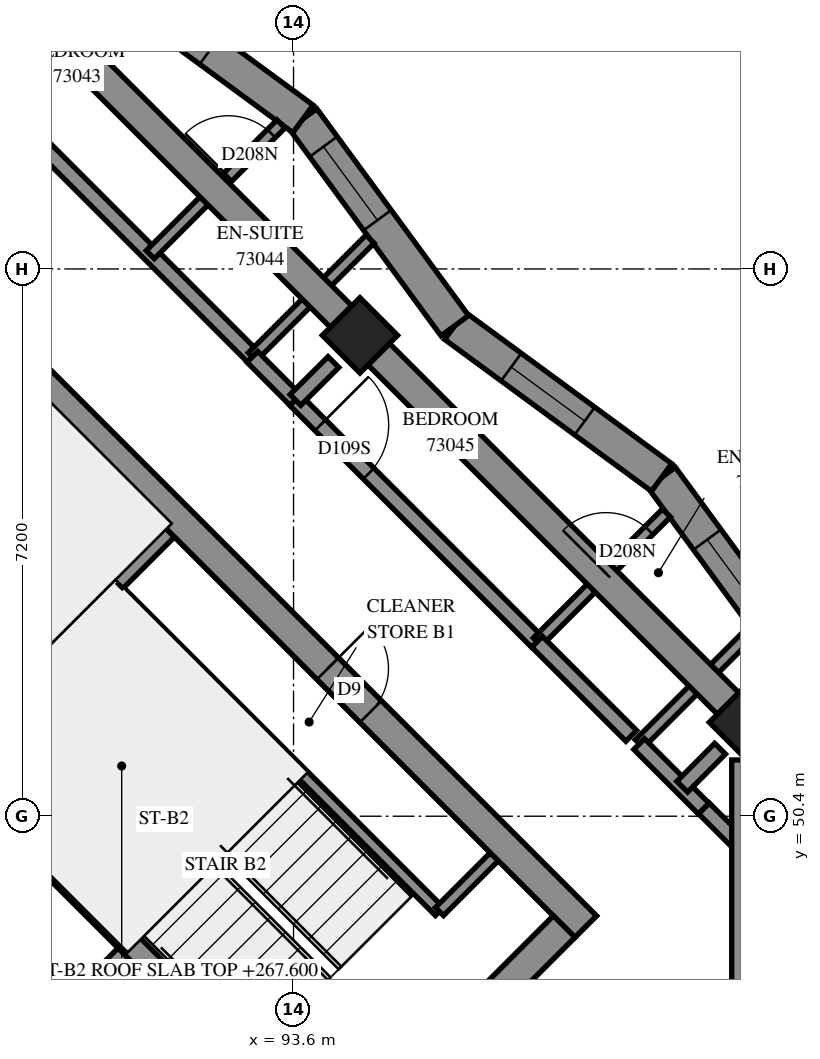
"""IFC4 building model, lengths in metres.
Left out: names, types, materials, properties, quantities, classifications, styles, units other than length and angle.
Written with IfcOpenShell. Run it as: python <this file> out.ifc"""

import sys

from ifc_helpers import new_model, si_unit, direction, frame, frame_2d, origin, origin_2d, place, context, subcontext, project, spatial, polyline, rectangle, outline, extrude, element, fill, save


model = new_model("IFC4")
c1 = context("Model", 3, precision=1e-05, world=origin(), true_north=direction((0.0, 1.0)))
c2 = subcontext(c1, "Body", "Model", "MODEL_VIEW")
j1 = project(units=[si_unit("LENGTHUNIT", "METRE"), si_unit("PLANEANGLEUNIT", "RADIAN")], contexts=[c1])
p1 = place(None, origin())
s1 = spatial("IfcSite", under=j1, at=p1, CompositionType="ELEMENT")
p2 = place(p1, origin())
s2 = spatial("IfcBuilding", under=s1, at=p2, CompositionType="ELEMENT")
p3 = place(p2, frame((0.0, 0.0, 267.6)))
s3 = spatial("IfcBuildingStorey", under=s2, at=p3, CompositionType="ELEMENT", Elevation=267.6)
for number, where, z_axis, x_axis in (
    (1, (94.474, 56.727, 0.0), (0.0, 0.0, 1.0), (0.707, -0.707, 0.0)),
    (2, (99.565, 51.635, 0.0), (0.0, 0.0, 1.0), (0.707, -0.707, 0.0)),
):
    element("IfcColumn", number, at=place(p3, frame(where, z_axis=z_axis, x_axis=x_axis)), inside=s3, PredefinedType="COLUMN", context=c2, shape_type="SweptSolid", body=[
        extrude(rectangle(XDim=0.7, YDim=0.7, at=origin_2d()), origin(), (0.0, 0.0, 1.0), 3.1),
    ])
p4 = place(p3, frame((86.695, 59.696, -0.3), z_axis=(0.0, 0.0, 1.0), x_axis=(0.7071100706, -0.7071034917, 0.0)))
e3 = element("IfcWall", 3, at=p4, inside=s3, PredefinedType="SHEAR", context=c2, shape_type="SweptSolid", body=[
    extrude(rectangle(XDim=15.2, YDim=0.4, at=frame_2d((7.6, 0.0))), origin(), (0.0, 0.0, 1.0), 2.7),
])
p5 = place(p4, frame((10.4, 0.0, 0.3)))
e4 = element("IfcOpeningElement", 4, at=p5, cuts=e3, PredefinedType="OPENING", context=c2, shape_type="SweptSolid", body=[
    extrude(rectangle(XDim=0.8, YDim=2.1, at=frame_2d((0.4, 1.05))), frame((0.0, 0.21, 0.0), z_axis=(0.0, -1.0, 0.0), x_axis=(1.0, 0.0, 0.0)), (0.0, 0.0, 1.0), 0.42),
])
p6 = place(p3, frame((86.978, 38.766, -0.3), z_axis=(0.0, 0.0, 1.0), x_axis=(0.7071067812, 0.7071067812, 0.0)))
e5 = element("IfcWall", 5, at=p6, inside=s3, PredefinedType="SHEAR", context=c2, shape_type="SweptSolid", body=[
    extrude(rectangle(XDim=14.4, YDim=0.4, at=frame_2d((7.2, 0.0))), origin(), (0.0, 0.0, 1.0), 2.7),
])
p7 = place(p6, frame((4.55, 0.0, 0.3)))
e6 = element("IfcOpeningElement", 6, at=p7, cuts=e5, PredefinedType="OPENING", context=c2, shape_type="SweptSolid", body=[
    extrude(rectangle(XDim=1.1, YDim=2.1, at=frame_2d((0.55, 1.05))), frame((0.0, 0.21, 0.0), z_axis=(0.0, -1.0, 0.0), x_axis=(1.0, 0.0, 0.0)), (0.0, 0.0, 1.0), 0.42),
])
p8 = place(p6, frame((11.35, 0.0, 0.3)))
e7 = element("IfcOpeningElement", 7, at=p8, cuts=e5, PredefinedType="OPENING", context=c2, shape_type="SweptSolid", body=[
    extrude(rectangle(XDim=1.1, YDim=2.1, at=frame_2d((0.55, 1.05))), frame((0.0, 0.21, 0.0), z_axis=(0.0, -1.0, 0.0), x_axis=(1.0, 0.0, 0.0)), (0.0, 0.0, 1.0), 0.42),
])
p9 = place(p3, frame((89.17, 46.332, 0.0), z_axis=(0.0, 0.0, 1.0), x_axis=(0.7071067812, 0.7071067812, 0.0)))
e8 = element("IfcWall", 8, at=p9, inside=s3, PredefinedType="SOLIDWALL", context=c2, shape_type="SweptSolid", body=[
    extrude(rectangle(XDim=3.3, YDim=0.3, at=frame_2d((1.65, 0.0))), origin(), (0.0, 0.0, 1.0), 3.1),
])
p10 = place(p3, frame((81.534, 53.969, 0.0), z_axis=(0.0, 0.0, 1.0), x_axis=(0.707103309, -0.7071102534, 0.0)))
e9 = element("IfcWall", 9, at=p10, inside=s3, PredefinedType="SOLIDWALL", context=c2, shape_type="SweptSolid", body=[
    extrude(rectangle(XDim=14.4, YDim=0.3, at=frame_2d((7.2, 0.0))), origin(), (0.0, 0.0, 1.0), 3.1),
])
p11 = place(p10, frame((8.55, 0.0, 0.0)))
e10 = element("IfcOpeningElement", 10, at=p11, cuts=e9, PredefinedType="OPENING", context=c2, shape_type="SweptSolid", body=[
    extrude(rectangle(XDim=0.9, YDim=2.1, at=frame_2d((0.45, 1.05))), frame((0.0, 0.16, 0.0), z_axis=(0.0, -1.0, 0.0), x_axis=(1.0, 0.0, 0.0)), (0.0, 0.0, 1.0), 0.32),
])
p12 = place(p10, frame((1.25, 0.0, 0.0)))
e11 = element("IfcOpeningElement", 11, at=p12, cuts=e9, PredefinedType="OPENING", context=c2, shape_type="SweptSolid", body=[
    extrude(rectangle(XDim=1.1, YDim=2.1, at=frame_2d((0.55, 1.05))), frame((0.0, 0.16, 0.0), z_axis=(0.0, -1.0, 0.0), x_axis=(1.0, 0.0, 0.0)), (0.0, 0.0, 1.0), 0.32),
])
p13 = place(p10, frame((4.85, 0.0, 0.0)))
e12 = element("IfcOpeningElement", 12, at=p13, cuts=e9, PredefinedType="OPENING", context=c2, shape_type="SweptSolid", body=[
    extrude(rectangle(XDim=1.1, YDim=2.1, at=frame_2d((0.55, 1.05))), frame((0.0, 0.16, 0.0), z_axis=(0.0, -1.0, 0.0), x_axis=(1.0, 0.0, 0.0)), (0.0, 0.0, 1.0), 0.32),
])
p14 = place(p10, frame((12.05, 0.0, 0.0)))
e13 = element("IfcOpeningElement", 13, at=p14, cuts=e9, PredefinedType="OPENING", context=c2, shape_type="SweptSolid", body=[
    extrude(rectangle(XDim=1.1, YDim=2.1, at=frame_2d((0.55, 1.05))), frame((0.0, 0.16, 0.0), z_axis=(0.0, -1.0, 0.0), x_axis=(1.0, 0.0, 0.0)), (0.0, 0.0, 1.0), 0.32),
])
p15 = place(p3, frame((88.958, 51.211, 0.0), z_axis=(0.0, 0.0, 1.0), x_axis=(0.7070998367, -0.7071137256, 0.0)))
e14 = element("IfcWall", 14, at=p15, inside=s3, PredefinedType="SOLIDWALL", context=c2, shape_type="SweptSolid", body=[
    extrude(rectangle(XDim=7.2, YDim=0.3, at=frame_2d((3.6, 0.0))), origin(), (0.0, 0.0, 1.0), 3.1),
])
p16 = place(p3, frame((88.958, 51.211, 0.0), z_axis=(0.0, 0.0, 1.0), x_axis=(0.7071067812, 0.7071067812, 0.0)))
e15 = element("IfcWall", 15, at=p16, inside=s3, PredefinedType="SOLIDWALL", context=c2, shape_type="SweptSolid", body=[
    extrude(rectangle(XDim=4.2, YDim=0.3, at=frame_2d((2.1, 0.0))), origin(), (0.0, 0.0, 1.0), 3.1),
])
p17 = place(p3, frame((99.246, 46.544, 0.0), z_axis=(0.0, 0.0, 1.0), x_axis=(0.7071067812, 0.7071067812, 0.0)))
e16 = element("IfcWall", 16, at=p17, inside=s3, PredefinedType="SOLIDWALL", context=c2, shape_type="SweptSolid", body=[
    extrude(outline(polyline([(0.225, -0.225), (6.137, -0.225), (5.513, 0.225), (-0.225, 0.225), (0.225, -0.225)])), origin(), (0.0, 0.0, 1.0), 3.1),
])
p18 = place(p17, frame((0.713, 0.0, 0.6)))
e17 = element("IfcOpeningElement", 17, at=p18, cuts=e16, PredefinedType="OPENING", context=c2, shape_type="SweptSolid", body=[
    extrude(rectangle(XDim=1.8, YDim=1.9, at=frame_2d((0.9, 0.95))), frame((0.0, 0.235, 0.0), z_axis=(0.0, -1.0, 0.0), x_axis=(1.0, 0.0, 0.0)), (0.0, 0.0, 1.0), 0.47),
])
p19 = place(p17, frame((3.969, 0.0, 0.6)))
e18 = element("IfcOpeningElement", 18, at=p19, cuts=e16, PredefinedType="OPENING", context=c2, shape_type="SweptSolid", body=[
    extrude(rectangle(XDim=1.2, YDim=1.9, at=frame_2d((0.6, 0.95))), frame((0.0, 0.235, 0.0), z_axis=(0.0, -1.0, 0.0), x_axis=(1.0, 0.0, 0.0)), (0.0, 0.0, 1.0), 0.47),
])
p20 = place(p3, frame((100.451, 52.12, 0.0), z_axis=(0.0, 0.0, 1.0), x_axis=(-0.5916343714, 0.8062064069, 0.0)))
e19 = element("IfcWall", 19, at=p20, inside=s3, PredefinedType="SOLIDWALL", context=c2, shape_type="SweptSolid", body=[
    extrude(outline(polyline([(0.054, -0.225), (3.429, -0.225), (3.36, 0.225), (-0.054, 0.225), (0.054, -0.225)])), origin(), (0.0, 0.0, 1.0), 3.1),
])
p21 = place(p20, frame((1.18, 0.0, 0.45)))
e20 = element("IfcOpeningElement", 20, at=p21, cuts=e19, PredefinedType="OPENING", context=c2, shape_type="SweptSolid", body=[
    extrude(rectangle(XDim=1.2, YDim=2.55, at=frame_2d((0.6, 1.275))), frame((0.0, 0.235, 0.0), z_axis=(0.0, -1.0, 0.0), x_axis=(1.0, 0.0, 0.0)), (0.0, 0.0, 1.0), 0.47),
])
p22 = place(p3, frame((98.442, 54.857, 0.0), z_axis=(0.0, 0.0, 1.0), x_axis=(-0.806200528, 0.5916423825, 0.0)))
e21 = element("IfcWall", 21, at=p22, inside=s3, PredefinedType="SOLIDWALL", context=c2, shape_type="SweptSolid", body=[
    extrude(outline(polyline([(-0.035, -0.225), (3.34, -0.225), (3.409, 0.225), (0.035, 0.225), (-0.035, -0.225)])), origin(), (0.0, 0.0, 1.0), 3.1),
])
p23 = place(p22, frame((1.255, 0.0, 0.45)))
e22 = element("IfcOpeningElement", 22, at=p23, cuts=e21, PredefinedType="OPENING", context=c2, shape_type="SweptSolid", body=[
    extrude(rectangle(XDim=1.2, YDim=2.55, at=frame_2d((0.6, 1.275))), frame((0.0, 0.235, 0.0), z_axis=(0.0, -1.0, 0.0), x_axis=(1.0, 0.0, 0.0)), (0.0, 0.0, 1.0), 0.47),
])
p24 = place(p3, frame((95.722, 56.854, 0.0), z_axis=(0.0, 0.0, 1.0), x_axis=(-0.5916565162, 0.8061901555, 0.0)))
e23 = element("IfcWall", 23, at=p24, inside=s3, PredefinedType="SOLIDWALL", context=c2, shape_type="SweptSolid", body=[
    extrude(outline(polyline([(0.035, -0.225), (3.409, -0.225), (3.34, 0.225), (-0.035, 0.225), (0.035, -0.225)])), origin(), (0.0, 0.0, 1.0), 3.1),
])
p25 = place(p24, frame((1.721, 0.0, 0.45)))
e24 = element("IfcOpeningElement", 24, at=p25, cuts=e23, PredefinedType="OPENING", context=c2, shape_type="SweptSolid", body=[
    extrude(rectangle(XDim=1.2, YDim=2.55, at=frame_2d((0.6, 1.275))), frame((0.0, 0.235, 0.0), z_axis=(0.0, -1.0, 0.0), x_axis=(1.0, 0.0, 0.0)), (0.0, 0.0, 1.0), 0.47),
])
p26 = place(p3, frame((93.725, 59.574, 0.0), z_axis=(0.0, 0.0, 1.0), x_axis=(-0.806200528, 0.5916423825, 0.0)))
e25 = element("IfcWall", 25, at=p26, inside=s3, PredefinedType="SOLIDWALL", context=c2, shape_type="SweptSolid", body=[
    extrude(outline(polyline([(-0.035, -0.225), (3.34, -0.225), (3.409, 0.225), (0.035, 0.225), (-0.035, -0.225)])), origin(), (0.0, 0.0, 1.0), 3.1),
])
p27 = place(p26, frame((1.522, 0.0, 0.45)))
e26 = element("IfcOpeningElement", 26, at=p27, cuts=e25, PredefinedType="OPENING", context=c2, shape_type="SweptSolid", body=[
    extrude(rectangle(XDim=1.2, YDim=2.55, at=frame_2d((0.6, 1.275))), frame((0.0, 0.235, 0.0), z_axis=(0.0, -1.0, 0.0), x_axis=(1.0, 0.0, 0.0)), (0.0, 0.0, 1.0), 0.47),
])
p28 = place(p3, frame((91.313, 53.354, 0.0), z_axis=(0.0, 0.0, 1.0), x_axis=(0.7071067812, -0.7071067812, 0.0)))
e27 = element("IfcWall", 27, at=p28, inside=s3, PredefinedType="PARTITIONING", context=c2, shape_type="SweptSolid", body=[
    extrude(rectangle(XDim=5.95, YDim=0.15, at=frame_2d((2.975, 0.0))), origin(), (0.0, 0.0, 1.0), 3.1),
])
p29 = place(p3, frame((95.52, 49.146, 0.0), z_axis=(0.0, 0.0, 1.0), x_axis=(0.7071067812, 0.7071067812, 0.0)))
e28 = element("IfcWall", 28, at=p29, inside=s3, PredefinedType="PARTITIONING", context=c2, shape_type="SweptSolid", body=[
    extrude(rectangle(XDim=1.02, YDim=0.15, at=frame_2d((0.51, 0.0))), origin(), (0.0, 0.0, 1.0), 3.1),
])
p30 = place(p3, frame((93.907, 42.585, 0.0), z_axis=(0.0, 0.0, 1.0), x_axis=(0.7071067812, 0.7071067812, 0.0)))
e29 = element("IfcWall", 29, at=p30, inside=s3, PredefinedType="PARTITIONING", context=c2, shape_type="SweptSolid", body=[
    extrude(rectangle(XDim=9.201, YDim=0.2, at=frame_2d((4.601, 0.0))), origin(), (0.0, 0.0, 1.0), 3.1),
])
p31 = place(p30, frame((0.193, 0.0, 0.0)))
e30 = element("IfcOpeningElement", 30, at=p31, cuts=e29, PredefinedType="OPENING", context=c2, shape_type="SweptSolid", body=[
    extrude(rectangle(XDim=1.0, YDim=2.1, at=frame_2d((0.5, 1.05))), frame((0.0, 0.11, 0.0), z_axis=(0.0, -1.0, 0.0), x_axis=(1.0, 0.0, 0.0)), (0.0, 0.0, 1.0), 0.22),
])
p32 = place(p3, frame((88.537, 60.973, 0.0), z_axis=(0.0, 0.0, 1.0), x_axis=(0.7071067812, -0.7071067812, 0.0)))
e31 = element("IfcWall", 31, at=p32, inside=s3, PredefinedType="PARTITIONING", context=c2, shape_type="SweptSolid", body=[
    extrude(rectangle(XDim=6.401, YDim=0.2, at=frame_2d((3.2, 0.0))), origin(), (0.0, 0.0, 1.0), 3.1),
])
p33 = place(p32, frame((0.615, 0.0, 0.0)))
e32 = element("IfcOpeningElement", 32, at=p33, cuts=e31, PredefinedType="OPENING", context=c2, shape_type="SweptSolid", body=[
    extrude(rectangle(XDim=0.9, YDim=2.1, at=frame_2d((0.45, 1.05))), frame((0.0, 0.11, 0.0), z_axis=(0.0, -1.0, 0.0), x_axis=(1.0, 0.0, 0.0)), (0.0, 0.0, 1.0), 0.22),
])
p34 = place(p3, frame((93.621, 55.875, 0.0), z_axis=(0.0, 0.0, 1.0), x_axis=(0.7071067812, -0.7071067812, 0.0)))
e33 = element("IfcWall", 33, at=p34, inside=s3, PredefinedType="PARTITIONING", context=c2, shape_type="SweptSolid", body=[
    extrude(rectangle(XDim=4.5, YDim=0.2, at=frame_2d((2.25, 0.0))), origin(), (0.0, 0.0, 1.0), 3.1),
])
p35 = place(p34, frame((0.467, 0.0, 0.0)))
e34 = element("IfcOpeningElement", 34, at=p35, cuts=e33, PredefinedType="OPENING", context=c2, shape_type="SweptSolid", body=[
    extrude(rectangle(XDim=0.9, YDim=2.1, at=frame_2d((0.45, 1.05))), frame((0.0, 0.11, 0.0), z_axis=(0.0, -1.0, 0.0), x_axis=(1.0, 0.0, 0.0)), (0.0, 0.0, 1.0), 0.22),
])
p36 = place(p3, frame((91.716, 57.788, 0.0), z_axis=(0.0, 0.0, 1.0), x_axis=(0.7071067812, 0.7071067812, 0.0)))
e35 = element("IfcWall", 35, at=p36, inside=s3, PredefinedType="PARTITIONING", context=c2, shape_type="SweptSolid", body=[
    extrude(rectangle(XDim=2.432, YDim=0.15, at=frame_2d((1.216, 0.0))), origin(), (0.0, 0.0, 1.0), 3.1),
])
p37 = place(p36, frame((1.452, 0.0, 0.0)))
e36 = element("IfcOpeningElement", 36, at=p37, cuts=e35, PredefinedType="OPENING", context=c2, shape_type="SweptSolid", body=[
    extrude(rectangle(XDim=0.8, YDim=2.1, at=frame_2d((0.4, 1.05))), frame((0.0, 0.085, 0.0), z_axis=(0.0, -1.0, 0.0), x_axis=(1.0, 0.0, 0.0)), (0.0, 0.0, 1.0), 0.17),
])
p38 = place(p3, frame((96.809, 52.693, 0.0), z_axis=(0.0, 0.0, 1.0), x_axis=(0.7075441989, 0.7066690927, 0.0)))
e37 = element("IfcWall", 37, at=p38, inside=s3, PredefinedType="PARTITIONING", context=c2, shape_type="SweptSolid", body=[
    extrude(rectangle(XDim=2.4, YDim=0.15, at=frame_2d((1.2, 0.0))), origin(), (0.0, 0.0, 1.0), 3.1),
])
p39 = place(p38, frame((1.275, 0.0, 0.0)))
e38 = element("IfcOpeningElement", 38, at=p39, cuts=e37, PredefinedType="OPENING", context=c2, shape_type="SweptSolid", body=[
    extrude(rectangle(XDim=0.8, YDim=2.1, at=frame_2d((0.4, 1.05))), frame((0.0, 0.085, 0.0), z_axis=(0.0, -1.0, 0.0), x_axis=(1.0, 0.0, 0.0)), (0.0, 0.0, 1.0), 0.17),
])
p40 = place(p3, frame((93.059, 56.445, 0.0), z_axis=(0.0, 0.0, 1.0), x_axis=(0.7071067812, 0.7071067812, 0.0)))
e39 = element("IfcWall", 39, at=p40, inside=s3, PredefinedType="PARTITIONING", context=c2, shape_type="SweptSolid", body=[
    extrude(rectangle(XDim=2.189, YDim=0.15, at=frame_2d((1.094, 0.0))), origin(), (0.0, 0.0, 1.0), 3.1),
])
p41 = place(p3, frame((98.149, 51.353, 0.0), z_axis=(0.0, 0.0, 1.0), x_axis=(0.7070830723, 0.7071304893, 0.0)))
e40 = element("IfcWall", 40, at=p41, inside=s3, PredefinedType="PARTITIONING", context=c2, shape_type="SweptSolid", body=[
    extrude(rectangle(XDim=2.109, YDim=0.15, at=frame_2d((1.054, 0.0))), origin(), (0.0, 0.0, 1.0), 3.1),
])
p42 = place(p3, frame((98.998, 50.504, 0.0), z_axis=(0.0, 0.0, 1.0), x_axis=(0.7076063266, -0.7066068826, 0.0)))
e41 = element("IfcWall", 41, at=p42, inside=s3, PredefinedType="PARTITIONING", context=c2, shape_type="SweptSolid", body=[
    extrude(rectangle(XDim=2.001, YDim=0.2, at=frame_2d((1.001, 0.0))), origin(), (0.0, 0.0, 1.0), 3.1),
])
p43 = place(p3, frame((96.805, 52.695, 0.0), z_axis=(0.0, 0.0, 1.0), x_axis=(0.7073923078, -0.7068211392, 0.0)))
e42 = element("IfcWall", 42, at=p43, inside=s3, PredefinedType="PARTITIONING", context=c2, shape_type="SweptSolid", body=[
    extrude(rectangle(XDim=1.751, YDim=0.2, at=frame_2d((0.875, 0.0))), origin(), (0.0, 0.0, 1.0), 3.1),
])
p44 = place(p3, frame((98.147, 51.349, 0.0), z_axis=(0.0, 0.0, 1.0), x_axis=(0.7071067812, -0.7071067812, 0.0)))
e43 = element("IfcWall", 43, at=p44, inside=s3, PredefinedType="PARTITIONING", context=c2, shape_type="SweptSolid", body=[
    extrude(rectangle(XDim=1.199, YDim=0.2, at=frame_2d((0.6, 0.0))), origin(), (0.0, 0.0, 1.0), 3.1),
])
p45 = place(p3, frame((93.059, 56.443, 0.0), z_axis=(0.0, 0.0, 1.0), x_axis=(0.7058541592, -0.7083571881, 0.0)))
e44 = element("IfcWall", 44, at=p45, inside=s3, PredefinedType="PARTITIONING", context=c2, shape_type="SweptSolid", body=[
    extrude(rectangle(XDim=0.799, YDim=0.2, at=frame_2d((0.4, 0.0))), origin(), (0.0, 0.0, 1.0), 3.1),
])
for number, where, z_axis, x_axis in (
    (45, (93.625, 55.877, 0.0), (0.0, 0.0, 1.0), (0.709, 0.706, 0.0)),
    (46, (98.714, 50.788, 0.0), (0.0, 0.0, 1.0), (0.706, 0.709, 0.0)),
):
    element("IfcWall", number, at=place(p3, frame(where, z_axis=z_axis, x_axis=x_axis)), inside=s3, PredefinedType="PARTITIONING", context=c2, shape_type="SweptSolid", body=[
        extrude(rectangle(XDim=0.706, YDim=0.2, at=frame_2d((0.353, 0.0))), origin(), (0.0, 0.0, 1.0), 3.1),
    ])
p46 = place(p21, origin())
e47 = element("IfcWindow", 47, at=p46, inside=s3, PartitioningType="SINGLE_PANEL", PredefinedType="WINDOW", context=c2, shape_type="SweptSolid", body=[
    extrude(rectangle(XDim=1.2, YDim=2.55, at=frame_2d((0.6, 1.275))), frame((0.0, 0.205, 0.0), z_axis=(0.0, -1.0, 0.0), x_axis=(1.0, 0.0, 0.0)), (0.0, 0.0, 1.0), 0.06),
])
fill(e20, e47)
p47 = place(p23, origin())
e48 = element("IfcWindow", 48, at=p47, inside=s3, PartitioningType="SINGLE_PANEL", PredefinedType="WINDOW", context=c2, shape_type="SweptSolid", body=[
    extrude(rectangle(XDim=1.2, YDim=2.55, at=frame_2d((0.6, 1.275))), frame((0.0, 0.205, 0.0), z_axis=(0.0, -1.0, 0.0), x_axis=(1.0, 0.0, 0.0)), (0.0, 0.0, 1.0), 0.06),
])
fill(e22, e48)
p48 = place(p25, origin())
e49 = element("IfcWindow", 49, at=p48, inside=s3, PartitioningType="SINGLE_PANEL", PredefinedType="WINDOW", context=c2, shape_type="SweptSolid", body=[
    extrude(rectangle(XDim=1.2, YDim=2.55, at=frame_2d((0.6, 1.275))), frame((0.0, 0.205, 0.0), z_axis=(0.0, -1.0, 0.0), x_axis=(1.0, 0.0, 0.0)), (0.0, 0.0, 1.0), 0.06),
])
fill(e24, e49)
p49 = place(p27, origin())
e50 = element("IfcWindow", 50, at=p49, inside=s3, PartitioningType="SINGLE_PANEL", PredefinedType="WINDOW", context=c2, shape_type="SweptSolid", body=[
    extrude(rectangle(XDim=1.2, YDim=2.55, at=frame_2d((0.6, 1.275))), frame((0.0, 0.205, 0.0), z_axis=(0.0, -1.0, 0.0), x_axis=(1.0, 0.0, 0.0)), (0.0, 0.0, 1.0), 0.06),
])
fill(e26, e50)
p50 = place(p5, origin())
e51 = element("IfcDoor", 51, at=p50, inside=s3, OperationType="SINGLE_SWING_RIGHT", PredefinedType="DOOR", context=c2, shape_type="SweptSolid", body=[
    extrude(rectangle(XDim=0.8, YDim=2.1, at=frame_2d((0.4, 1.05))), frame((0.0, 0.025, 0.0), z_axis=(0.0, -1.0, 0.0), x_axis=(1.0, 0.0, 0.0)), (0.0, 0.0, 1.0), 0.05),
])
fill(e4, e51)
p51 = place(p37, origin())
e52 = element("IfcDoor", 52, at=p51, inside=s3, OperationType="SINGLE_SWING_RIGHT", PredefinedType="DOOR", context=c2, shape_type="SweptSolid", body=[
    extrude(rectangle(XDim=0.8, YDim=2.1, at=frame_2d((0.4, 1.05))), frame((0.0, 0.025, 0.0), z_axis=(0.0, -1.0, 0.0), x_axis=(1.0, 0.0, 0.0)), (0.0, 0.0, 1.0), 0.05),
])
fill(e36, e52)
p52 = place(p35, origin())
e53 = element("IfcDoor", 53, at=p52, inside=s3, OperationType="SINGLE_SWING_LEFT", PredefinedType="DOOR", context=c2, shape_type="SweptSolid", body=[
    extrude(rectangle(XDim=0.9, YDim=2.1, at=frame_2d((0.45, 1.05))), frame((0.0, 0.025, 0.0), z_axis=(0.0, -1.0, 0.0), x_axis=(1.0, 0.0, 0.0)), (0.0, 0.0, 1.0), 0.05),
])
fill(e34, e53)
p53 = place(p39, origin())
e54 = element("IfcDoor", 54, at=p53, inside=s3, OperationType="SINGLE_SWING_RIGHT", PredefinedType="DOOR", context=c2, shape_type="SweptSolid", body=[
    extrude(rectangle(XDim=0.8, YDim=2.1, at=frame_2d((0.4, 1.05))), frame((0.0, 0.025, 0.0), z_axis=(0.0, -1.0, 0.0), x_axis=(1.0, 0.0, 0.0)), (0.0, 0.0, 1.0), 0.05),
])
fill(e38, e54)
save(model, sys.argv[1])
